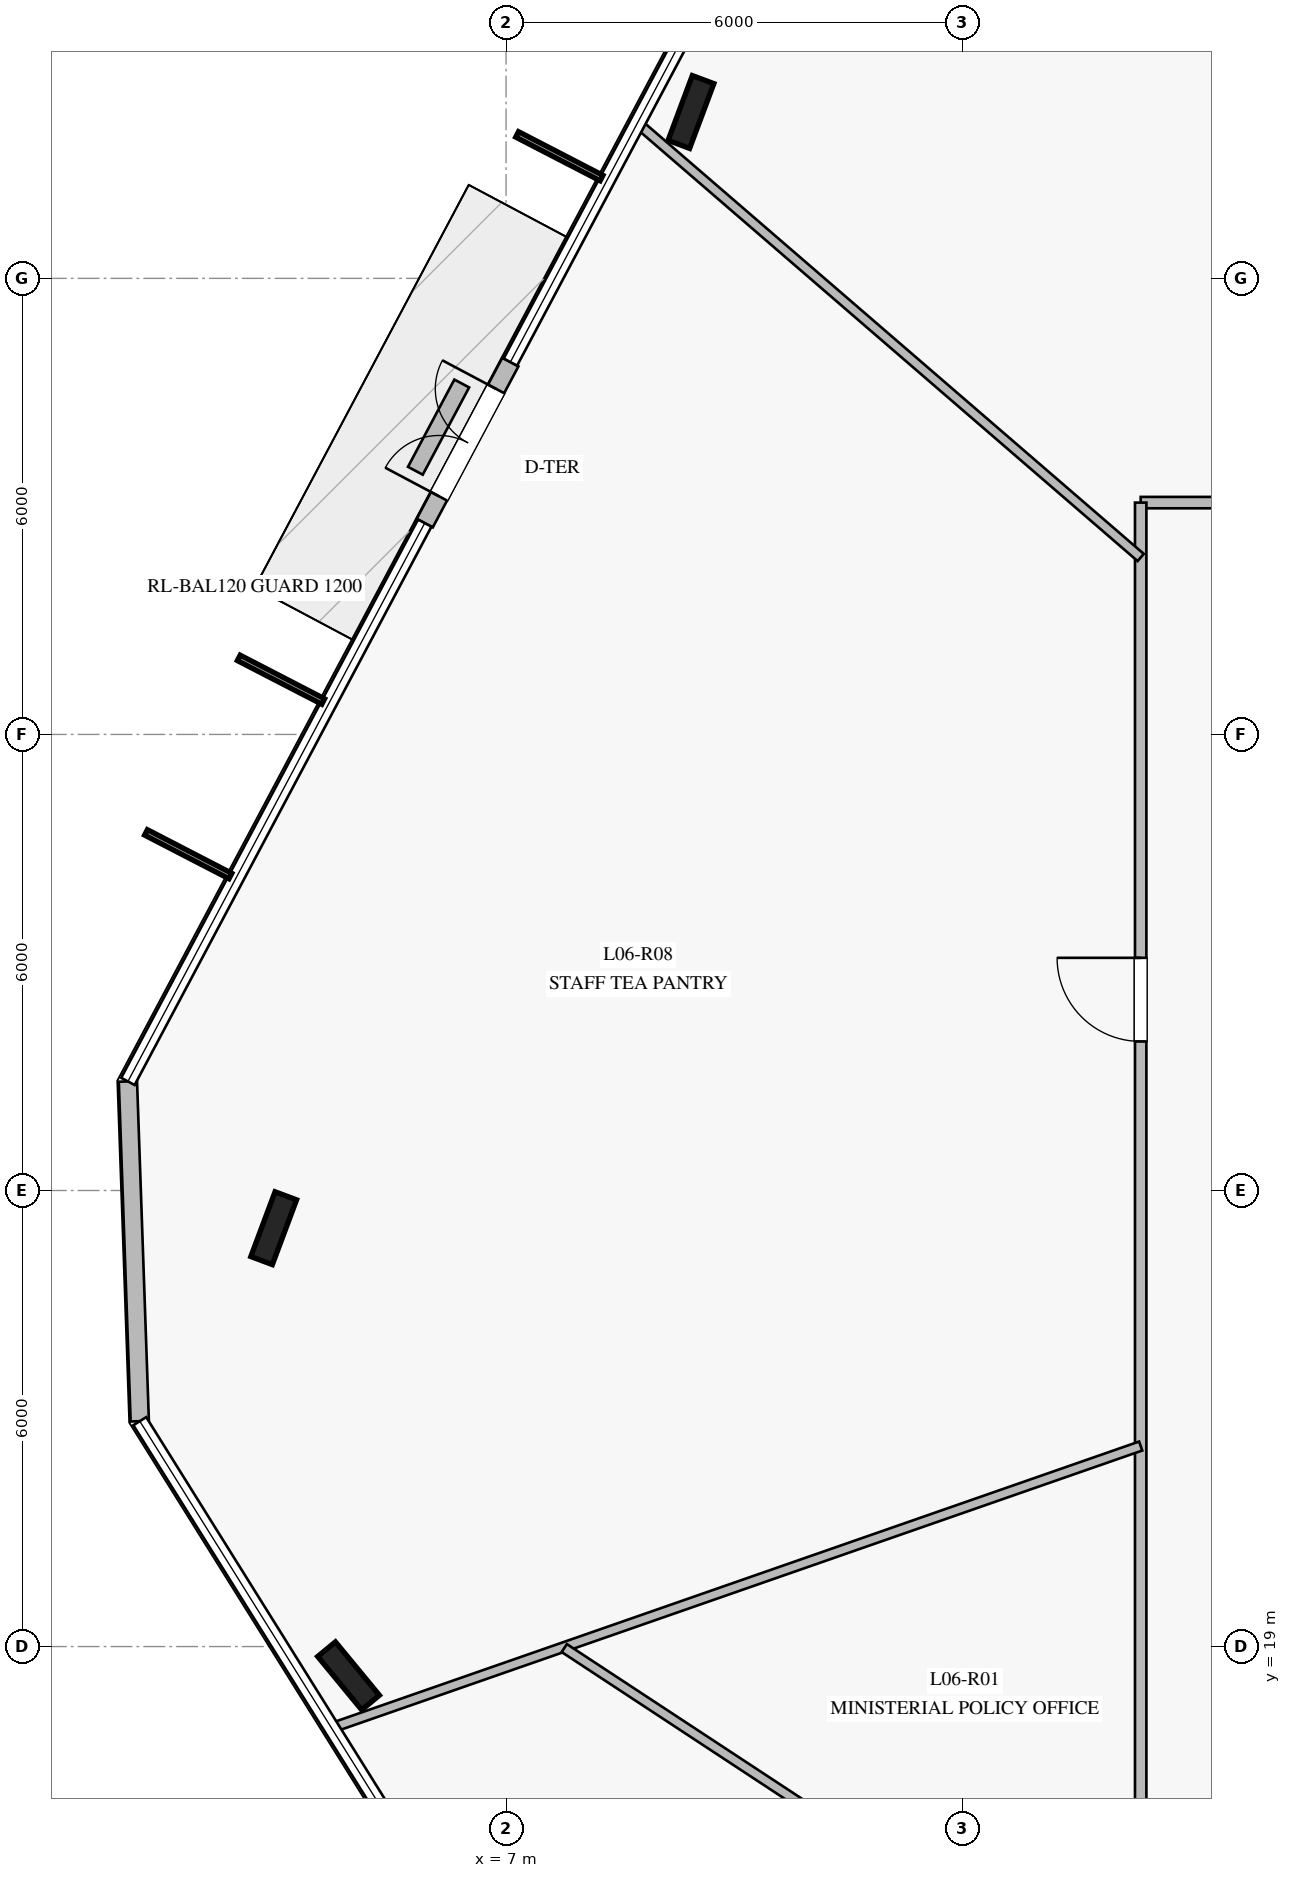
"""IFC4 building model, lengths in metres.
Left out: names, types, materials, properties, quantities, classifications, styles, units other than length and angle.
Written with IfcOpenShell. Run it as: python <this file> out.ifc"""

import sys

from ifc_helpers import new_model, si_unit, direction, frame, frame_2d, origin, origin_2d, place, context, subcontext, project, spatial, rectangle, i_section, extrude, element, fill, save


model = new_model("IFC4")
c1 = context("Model", 3, precision=1e-05, world=origin(), true_north=direction((0.0, 1.0)))
c2 = subcontext(c1, "Body", "Model", "MODEL_VIEW")
j1 = project(units=[si_unit("LENGTHUNIT", "METRE"), si_unit("PLANEANGLEUNIT", "RADIAN")], contexts=[c1])
p1 = place(None, origin())
s1 = spatial("IfcSite", under=j1, at=p1, CompositionType="ELEMENT")
p2 = place(p1, origin())
s2 = spatial("IfcBuilding", under=s1, at=p2, CompositionType="ELEMENT")
p3 = place(p2, frame((0.0, 0.0, 28.0)))
s3 = spatial("IfcBuildingStorey", under=s2, at=p3, CompositionType="ELEMENT", Elevation=28.0)
for number, where, z_axis, x_axis in (
    (1, (9.433, 39.189, 0.0), (0.0, 0.0, 1.0), (0.35, 0.937, 0.0)),
    (2, (3.943, 24.504, 0.0), (0.0, 0.0, 1.0), (0.35, 0.937, 0.0)),
    (3, (4.928, 18.614, 0.0), (0.0, 0.0, 1.0), (-0.636, 0.772, 0.0)),
):
    element("IfcColumn", number, at=place(p3, frame(where, z_axis=z_axis, x_axis=x_axis)), inside=s3, PredefinedType="COLUMN", context=c2, shape_type="SweptSolid", body=[
        extrude(i_section(OverallWidth=0.302, OverallDepth=0.91, WebThickness=0.021, FlangeThickness=0.04, at=origin_2d()), origin(), (0.0, 0.0, 1.0), 4.0),
    ])
p4 = place(p3, frame((7.057, 35.899, 0.0), z_axis=(0.0, 0.0, 1.0), x_axis=(-0.469574169619, -0.88289302819, 0.0)))
e4 = element("IfcWall", 4, at=p4, inside=s3, PredefinedType="STANDARD", context=c2, shape_type="SweptSolid", body=[
    extrude(rectangle(XDim=2.4, YDim=0.24, at=frame_2d((1.2, 0.0))), origin(), (0.0, 0.0, 1.0), 3.76),
])
p5 = place(p4, frame((0.4, 0.0, 0.0)))
e5 = element("IfcOpeningElement", 5, at=p5, cuts=e4, PredefinedType="OPENING", context=c2, shape_type="SweptSolid", body=[
    extrude(rectangle(XDim=1.6, YDim=2.25, at=frame_2d((0.8, 1.125))), frame((0.0, 0.13, 0.0), z_axis=(0.0, -1.0, 0.0), x_axis=(1.0, 0.0, 0.0)), (0.0, 0.0, 1.0), 0.26),
])
p6 = place(p3, frame((2.025, 26.435, 0.0), z_axis=(0.0, 0.0, 1.0), x_axis=(0.034879631963, -0.999391520513, 0.0)))
e6 = element("IfcWall", 6, at=p6, inside=s3, PredefinedType="STANDARD", context=c2, shape_type="SweptSolid", body=[
    extrude(rectangle(XDim=4.473, YDim=0.24, at=frame_2d((2.236, 0.0))), origin(), (0.0, 0.0, 1.0), 3.76),
])
p7 = place(p3, frame((6.417, 35.617, 0.0), z_axis=(0.0, 0.0, 1.0), x_axis=(-0.4693108362, -0.883033033938, 0.0)))
e7 = element("IfcWall", 7, at=p7, inside=s3, PredefinedType="USERDEFINED", context=c2, shape_type="SweptSolid", body=[
    extrude(rectangle(XDim=1.3, YDim=0.22, at=frame_2d((0.65, 0.0))), origin(), (0.0, 0.0, 1.0), 0.4),
])
p8 = place(p3, frame((15.35, 34.05, 0.0), z_axis=(0.0, 0.0, 1.0), x_axis=(1.0, 0.0, 0.0)))
e8 = element("IfcWall", 8, at=p8, inside=s3, PredefinedType="PARTITIONING", context=c2, shape_type="SweptSolid", body=[
    extrude(rectangle(XDim=19.3, YDim=0.15, at=frame_2d((9.65, 0.0))), origin(), (0.0, 0.0, 1.0), 3.21),
])
p9 = place(p8, frame((14.523, 0.0, 0.0)))
e9 = element("IfcOpeningElement", 9, at=p9, cuts=e8, PredefinedType="OPENING", context=c2, shape_type="SweptSolid", body=[
    extrude(rectangle(XDim=1.1, YDim=2.2, at=frame_2d((0.55, 1.1))), frame((0.0, 0.085, 0.0), z_axis=(0.0, -1.0, 0.0), x_axis=(1.0, 0.0, 0.0)), (0.0, 0.0, 1.0), 0.17),
])
p10 = place(p8, frame((5.327, 0.0, 0.0)))
e10 = element("IfcOpeningElement", 10, at=p10, cuts=e8, PredefinedType="OPENING", context=c2, shape_type="SweptSolid", body=[
    extrude(rectangle(XDim=1.1, YDim=2.2, at=frame_2d((0.55, 1.1))), frame((0.0, 0.085, 0.0), z_axis=(0.0, -1.0, 0.0), x_axis=(1.0, 0.0, 0.0)), (0.0, 0.0, 1.0), 0.17),
])
p11 = place(p3, frame((15.35, 15.95, 0.0), z_axis=(0.0, 0.0, 1.0), x_axis=(0.0, 1.0, 0.0)))
e11 = element("IfcWall", 11, at=p11, inside=s3, PredefinedType="PARTITIONING", context=c2, shape_type="SweptSolid", body=[
    extrude(rectangle(XDim=18.1, YDim=0.15, at=frame_2d((9.05, 0.0))), origin(), (0.0, 0.0, 1.0), 3.21),
])
p12 = place(p11, frame((11.011, 0.0, 0.0)))
e12 = element("IfcOpeningElement", 12, at=p12, cuts=e11, PredefinedType="OPENING", context=c2, shape_type="SweptSolid", body=[
    extrude(rectangle(XDim=1.1, YDim=2.2, at=frame_2d((0.55, 1.1))), frame((0.0, 0.085, 0.0), z_axis=(0.0, -1.0, 0.0), x_axis=(1.0, 0.0, 0.0)), (0.0, 0.0, 1.0), 0.17),
])
p13 = place(p3, frame((15.35, 33.328, 0.0), z_axis=(0.0, 0.0, 1.0), x_axis=(-0.757044964205, 0.65336277991, 0.0)))
e13 = element("IfcWall", 13, at=p13, inside=s3, PredefinedType="PARTITIONING", context=c2, shape_type="SweptSolid", body=[
    extrude(rectangle(XDim=8.729, YDim=0.125, at=frame_2d((4.364, 0.0))), origin(), (0.0, 0.0, 1.0), 3.06),
])
p14 = place(p3, frame((15.35, 21.638, 0.0), z_axis=(0.0, 0.0, 1.0), x_axis=(-0.944346596396, -0.328952133105, 0.0)))
e14 = element("IfcWall", 14, at=p14, inside=s3, PredefinedType="PARTITIONING", context=c2, shape_type="SweptSolid", body=[
    extrude(rectangle(XDim=11.257, YDim=0.125, at=frame_2d((5.628, 0.0))), origin(), (0.0, 0.0, 1.0), 3.06),
])
p15 = place(p3, frame((7.766, 18.98, 0.0), z_axis=(0.0, 0.0, 1.0), x_axis=(0.83545815699, -0.549554062781, 0.0)))
e15 = element("IfcWall", 15, at=p15, inside=s3, PredefinedType="PARTITIONING", context=c2, shape_type="SweptSolid", body=[
    extrude(rectangle(XDim=17.092, YDim=0.125, at=frame_2d((8.546, 0.0))), origin(), (0.0, 0.0, 1.0), 3.05),
])
p16 = place(p15, frame((8.046, 0.0, 0.0)))
e16 = element("IfcOpeningElement", 16, at=p16, cuts=e15, PredefinedType="OPENING", context=c2, shape_type="SweptSolid", body=[
    extrude(rectangle(XDim=1.0, YDim=2.15, at=frame_2d((0.5, 1.075))), frame((0.0, 0.073, 0.0), z_axis=(0.0, -1.0, 0.0), x_axis=(1.0, 0.0, 0.0)), (0.0, 0.0, 1.0), 0.145),
])
p17 = place(p5, frame((1.6, 0.0, 0.0), z_axis=(0.0, 0.0, 1.0), x_axis=(-1.0, 0.0, 0.0)))
e17 = element("IfcDoor", 17, at=p17, inside=s3, OperationType="DOUBLE_DOOR_SINGLE_SWING", PredefinedType="DOOR", context=c2, shape_type="SweptSolid", body=[
    extrude(rectangle(XDim=1.6, YDim=2.25, at=frame_2d((0.8, 1.125))), frame((0.0, 0.025, 0.0), z_axis=(0.0, -1.0, 0.0), x_axis=(1.0, 0.0, 0.0)), (0.0, 0.0, 1.0), 0.05),
])
fill(e5, e17)
p18 = place(p12, origin())
e18 = element("IfcDoor", 18, at=p18, inside=s3, OperationType="SINGLE_SWING_RIGHT", PredefinedType="DOOR", context=c2, shape_type="SweptSolid", body=[
    extrude(rectangle(XDim=1.1, YDim=2.2, at=frame_2d((0.55, 1.1))), frame((0.0, 0.025, 0.0), z_axis=(0.0, -1.0, 0.0), x_axis=(1.0, 0.0, 0.0)), (0.0, 0.0, 1.0), 0.05),
])
fill(e12, e18)
save(model, sys.argv[1])
